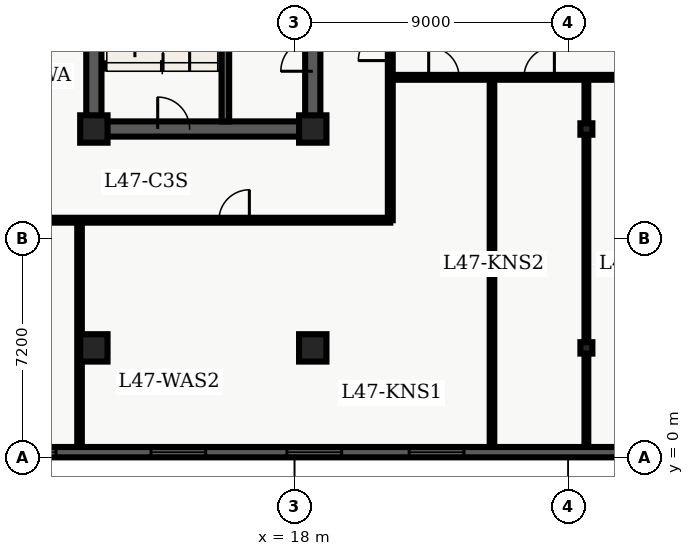
"""IFC4 building model, lengths in metres.
Left out: names, types, materials, properties, quantities, classifications, styles, units other than length and angle.
Written with IfcOpenShell. Run it as: python <this file> out.ifc"""

import sys

from ifc_helpers import new_model, entity, si_unit, converted_unit, direction, frame, origin_with_axes, origin_2d_with_axis, place, context, subcontext, project, spatial, polyline, rectangle, i_section, outline, extrude, element, fill, save


model = new_model("IFC4")
c1 = context("Model", 3, precision=1e-05, world=origin_with_axes(), true_north=direction((0.0, 1.0)))
c2 = subcontext(c1, "Body", "Model", "MODEL_VIEW")
j1 = project(units=[si_unit("LENGTHUNIT", "METRE"), converted_unit("PLANEANGLEUNIT", "DEGREE", entity("IfcPlaneAngleMeasure", 0.017), si_unit("PLANEANGLEUNIT", "RADIAN"), dimensions=[0, 0, 0, 0, 0, 0, 0])], contexts=[c1])
p1 = place(None, origin_with_axes())
s1 = spatial("IfcSite", under=j1, at=p1, CompositionType="ELEMENT")
p2 = place(p1, origin_with_axes())
s2 = spatial("IfcBuilding", under=s1, at=p2, CompositionType="ELEMENT")
p3 = place(p2, frame((0.0, 0.0, 192.6), z_axis=(0.0, 0.0, 1.0), x_axis=(1.0, 0.0, 0.0)))
s3 = spatial("IfcBuildingStorey", under=s2, at=p3, CompositionType="ELEMENT", Elevation=192.6)
p4 = place(p3, frame((11.4, 10.8, 0.0), z_axis=(0.0, 0.0, 1.0), x_axis=(0.0, 1.0, 0.0)))
e1 = element("IfcWall", 1, at=p4, inside=s3, PredefinedType="SHEAR", context=c2, shape_type="SweptSolid", body=[
    extrude(outline(polyline([(0.0, -0.25), (27.0, -0.25), (27.0, 0.25), (0.0, 0.25), (0.0, -0.25)])), origin_with_axes(), (0.0, 0.0, 1.0), 3.66),
])
p5 = place(p3, frame((11.4, 10.8, 0.0), z_axis=(0.0, 0.0, 1.0), x_axis=(1.0, 0.0, 0.0)))
e2 = element("IfcWall", 2, at=p5, inside=s3, PredefinedType="SHEAR", context=c2, shape_type="SweptSolid", body=[
    extrude(outline(polyline([(0.0, -0.25), (7.2, -0.25), (7.2, 0.25), (0.0, 0.25), (0.0, -0.25)])), origin_with_axes(), (0.0, 0.0, 1.0), 3.66),
])
p6 = place(p5, frame((2.625, 0.0, 0.0), z_axis=(0.0, 0.0, 1.0), x_axis=(1.0, 0.0, 0.0)))
e3 = element("IfcOpeningElement", 3, at=p6, cuts=e2, PredefinedType="OPENING", context=c2, shape_type="SweptSolid", body=[
    extrude(rectangle(XDim=1.05, YDim=0.52, at=origin_2d_with_axis()), origin_with_axes(), (0.0, 0.0, 1.0), 2.15),
])
p7 = place(p3, frame((18.6, 10.8, 0.0), z_axis=(0.0, 0.0, 1.0), x_axis=(0.0, 1.0, 0.0)))
e4 = element("IfcWall", 4, at=p7, inside=s3, PredefinedType="SHEAR", context=c2, shape_type="SweptSolid", body=[
    extrude(outline(polyline([(0.0, -0.25), (13.5, -0.25), (13.5, 0.25), (0.0, 0.25), (0.0, -0.25)])), origin_with_axes(), (0.0, 0.0, 1.0), 3.66),
])
p8 = place(p7, frame((11.125, 0.0, 0.0), z_axis=(0.0, 0.0, 1.0), x_axis=(1.0, 0.0, 0.0)))
e5 = element("IfcOpeningElement", 5, at=p8, cuts=e4, PredefinedType="OPENING", context=c2, shape_type="SweptSolid", body=[
    extrude(rectangle(XDim=1.05, YDim=0.52, at=origin_2d_with_axis()), origin_with_axes(), (0.0, 0.0, 1.0), 2.15),
])
p9 = place(p7, frame((2.425, 0.0, 0.0), z_axis=(0.0, 0.0, 1.0), x_axis=(1.0, 0.0, 0.0)))
e6 = element("IfcOpeningElement", 6, at=p9, cuts=e4, PredefinedType="OPENING", context=c2, shape_type="SweptSolid", body=[
    extrude(rectangle(XDim=1.05, YDim=0.52, at=origin_2d_with_axis()), origin_with_axes(), (0.0, 0.0, 1.0), 2.15),
])
p10 = place(p7, frame((6.625, 0.0, 0.0), z_axis=(0.0, 0.0, 1.0), x_axis=(1.0, 0.0, 0.0)))
e7 = element("IfcOpeningElement", 7, at=p10, cuts=e4, PredefinedType="OPENING", context=c2, shape_type="SweptSolid", body=[
    extrude(rectangle(XDim=1.05, YDim=0.52, at=origin_2d_with_axis()), origin_with_axes(), (0.0, 0.0, 1.0), 2.15),
])
p11 = place(p3, frame((15.725, 11.05, 0.0), z_axis=(0.0, 0.0, 1.0), x_axis=(0.0, 1.0, 0.0)))
e8 = element("IfcWall", 8, at=p11, inside=s3, PredefinedType="SHEAR", context=c2, shape_type="SweptSolid", body=[
    extrude(outline(polyline([(0.0, -0.125), (8.65, -0.125), (8.65, 0.125), (0.0, 0.125), (0.0, -0.125)])), origin_with_axes(), (0.0, 0.0, 1.0), 3.66),
])
for number, where, z_axis, x_axis in (
    (9, (11.4, 3.6, 0.0), (0.0, 0.0, 1.0), (1.0, 0.0, 0.0)),
    (10, (11.4, 10.8, 0.0), (0.0, 0.0, 1.0), (1.0, 0.0, 0.0)),
    (11, (18.6, 3.6, 0.0), (0.0, 0.0, 1.0), (1.0, 0.0, 0.0)),
    (12, (18.6, 10.8, 0.0), (0.0, 0.0, 1.0), (1.0, 0.0, 0.0)),
):
    element("IfcColumn", number, at=place(p3, frame(where, z_axis=z_axis, x_axis=x_axis)), inside=s3, PredefinedType="COLUMN", context=c2, shape_type="SweptSolid", body=[
        extrude(rectangle(XDim=0.9, YDim=0.9, at=origin_2d_with_axis()), origin_with_axes(), (0.0, 0.0, 1.0), 3.9),
    ])
for number, where, z_axis, x_axis in (
    (13, (27.6, 3.6, 0.0), (0.0, 0.0, 1.0), (1.0, 0.0, 0.0)),
    (14, (27.6, 10.8, 0.0), (0.0, 0.0, 1.0), (1.0, 0.0, 0.0)),
):
    element("IfcColumn", number, at=place(p3, frame(where, z_axis=z_axis, x_axis=x_axis)), inside=s3, PredefinedType="COLUMN", context=c2, shape_type="SweptSolid", body=[
        extrude(i_section(OverallWidth=0.394, OverallDepth=0.375, WebThickness=0.017, FlangeThickness=0.028, FilletRadius=0.02, at=origin_2d_with_axis()), origin_with_axes(), (0.0, 0.0, 1.0), 3.9),
    ])
p12 = place(p3, frame((2.6, 7.8, 0.0), z_axis=(0.0, 0.0, 1.0), x_axis=(1.0, 0.0, 0.0)))
e15 = element("IfcWall", 15, at=p12, inside=s3, PredefinedType="PARTITIONING", context=c2, shape_type="SweptSolid", body=[
    extrude(outline(polyline([(0.0, -0.08), (18.55, -0.08), (18.55, 0.08), (0.0, 0.08), (0.0, -0.08)])), origin_with_axes(), (0.0, 0.0, 1.0), 2.7),
])
p13 = place(p12, frame((5.04, 0.0, 0.0), z_axis=(0.0, 0.0, 1.0), x_axis=(1.0, 0.0, 0.0)))
e16 = element("IfcOpeningElement", 16, at=p13, cuts=e15, PredefinedType="OPENING", context=c2, shape_type="SweptSolid", body=[
    extrude(rectangle(XDim=1.2, YDim=0.18, at=origin_2d_with_axis()), origin_with_axes(), (0.0, 0.0, 1.0), 2.2),
])
p14 = place(p12, frame((13.415, 0.0, 0.0), z_axis=(0.0, 0.0, 1.0), x_axis=(1.0, 0.0, 0.0)))
e17 = element("IfcOpeningElement", 17, at=p14, cuts=e15, PredefinedType="OPENING", context=c2, shape_type="SweptSolid", body=[
    extrude(rectangle(XDim=1.0, YDim=0.18, at=origin_2d_with_axis()), origin_with_axes(), (0.0, 0.0, 1.0), 2.15),
])
p15 = place(p3, frame((21.15, 7.8, 0.0), z_axis=(0.0, 0.0, 1.0), x_axis=(0.0, 1.0, 0.0)))
e18 = element("IfcWall", 18, at=p15, inside=s3, PredefinedType="PARTITIONING", context=c2, shape_type="SweptSolid", body=[
    extrude(outline(polyline([(0.0, -0.08), (32.7, -0.08), (32.7, 0.08), (0.0, 0.08), (0.0, -0.08)])), origin_with_axes(), (0.0, 0.0, 1.0), 2.7),
])
p16 = place(p15, frame((15.589, 0.0, 0.0), z_axis=(0.0, 0.0, 1.0), x_axis=(1.0, 0.0, 0.0)))
e19 = element("IfcOpeningElement", 19, at=p16, cuts=e18, PredefinedType="OPENING", context=c2, shape_type="SweptSolid", body=[
    extrude(rectangle(XDim=1.0, YDim=0.18, at=origin_2d_with_axis()), origin_with_axes(), (0.0, 0.0, 1.0), 2.15),
])
p17 = place(p15, frame((19.026, 0.0, 0.0), z_axis=(0.0, 0.0, 1.0), x_axis=(1.0, 0.0, 0.0)))
e20 = element("IfcOpeningElement", 20, at=p17, cuts=e18, PredefinedType="OPENING", context=c2, shape_type="SweptSolid", body=[
    extrude(rectangle(XDim=1.0, YDim=0.18, at=origin_2d_with_axis()), origin_with_axes(), (0.0, 0.0, 1.0), 2.15),
])
p18 = place(p15, frame((22.849, 0.0, 0.0), z_axis=(0.0, 0.0, 1.0), x_axis=(1.0, 0.0, 0.0)))
e21 = element("IfcOpeningElement", 21, at=p18, cuts=e18, PredefinedType="OPENING", context=c2, shape_type="SweptSolid", body=[
    extrude(rectangle(XDim=1.0, YDim=0.18, at=origin_2d_with_axis()), origin_with_axes(), (0.0, 0.0, 1.0), 2.15),
])
p19 = place(p15, frame((27.204, 0.0, 0.0), z_axis=(0.0, 0.0, 1.0), x_axis=(1.0, 0.0, 0.0)))
e22 = element("IfcOpeningElement", 22, at=p19, cuts=e18, PredefinedType="OPENING", context=c2, shape_type="SweptSolid", body=[
    extrude(rectangle(XDim=1.0, YDim=0.18, at=origin_2d_with_axis()), origin_with_axes(), (0.0, 0.0, 1.0), 2.15),
])
p20 = place(p15, frame((31.042, 0.0, 0.0), z_axis=(0.0, 0.0, 1.0), x_axis=(1.0, 0.0, 0.0)))
e23 = element("IfcOpeningElement", 23, at=p20, cuts=e18, PredefinedType="OPENING", context=c2, shape_type="SweptSolid", body=[
    extrude(rectangle(XDim=1.0, YDim=0.18, at=origin_2d_with_axis()), origin_with_axes(), (0.0, 0.0, 1.0), 2.15),
])
p21 = place(p15, frame((5.775, 0.0, 0.0), z_axis=(0.0, 0.0, 1.0), x_axis=(1.0, 0.0, 0.0)))
e24 = element("IfcOpeningElement", 24, at=p21, cuts=e18, PredefinedType="OPENING", context=c2, shape_type="SweptSolid", body=[
    extrude(rectangle(XDim=1.05, YDim=0.18, at=origin_2d_with_axis()), origin_with_axes(), (0.0, 0.0, 1.0), 2.15),
])
p22 = place(p3, frame((10.929, 0.335, 0.0), z_axis=(0.0, 0.0, 1.0), x_axis=(0.0, 1.0, 0.0)))
e25 = element("IfcWall", 25, at=p22, inside=s3, PredefinedType="PARTITIONING", context=c2, shape_type="SweptSolid", body=[
    extrude(outline(polyline([(0.0, -0.075), (7.365, -0.075), (7.365, 0.075), (0.0, 0.075), (0.0, -0.075)])), origin_with_axes(), (0.0, 0.0, 1.0), 2.7),
])
p23 = place(p3, frame((21.15, 12.5, 0.0), z_axis=(0.0, 0.0, 1.0), x_axis=(1.0, 0.0, 0.0)))
e26 = element("IfcWall", 26, at=p23, inside=s3, PredefinedType="PARTITIONING", context=c2, shape_type="SweptSolid", body=[
    extrude(outline(polyline([(0.0, -0.08), (15.2, -0.08), (15.2, 0.08), (0.0, 0.08), (0.0, -0.08)])), origin_with_axes(), (0.0, 0.0, 1.0), 2.7),
])
p24 = place(p23, frame((1.762, 0.0, 0.0), z_axis=(0.0, 0.0, 1.0), x_axis=(1.0, 0.0, 0.0)))
e27 = element("IfcOpeningElement", 27, at=p24, cuts=e26, PredefinedType="OPENING", context=c2, shape_type="SweptSolid", body=[
    extrude(rectangle(XDim=1.0, YDim=0.18, at=origin_2d_with_axis()), origin_with_axes(), (0.0, 0.0, 1.0), 2.15),
])
p25 = place(p23, frame((4.897, 0.0, 0.0), z_axis=(0.0, 0.0, 1.0), x_axis=(1.0, 0.0, 0.0)))
e28 = element("IfcOpeningElement", 28, at=p25, cuts=e26, PredefinedType="OPENING", context=c2, shape_type="SweptSolid", body=[
    extrude(rectangle(XDim=1.0, YDim=0.18, at=origin_2d_with_axis()), origin_with_axes(), (0.0, 0.0, 1.0), 2.15),
])
p26 = place(p23, frame((8.527, 0.0, 0.0), z_axis=(0.0, 0.0, 1.0), x_axis=(1.0, 0.0, 0.0)))
e29 = element("IfcOpeningElement", 29, at=p26, cuts=e26, PredefinedType="OPENING", context=c2, shape_type="SweptSolid", body=[
    extrude(rectangle(XDim=1.0, YDim=0.18, at=origin_2d_with_axis()), origin_with_axes(), (0.0, 0.0, 1.0), 2.15),
])
p27 = place(p23, frame((12.863, 0.0, 0.0), z_axis=(0.0, 0.0, 1.0), x_axis=(1.0, 0.0, 0.0)))
e30 = element("IfcOpeningElement", 30, at=p27, cuts=e26, PredefinedType="OPENING", context=c2, shape_type="SweptSolid", body=[
    extrude(rectangle(XDim=1.0, YDim=0.18, at=origin_2d_with_axis()), origin_with_axes(), (0.0, 0.0, 1.0), 2.15),
])
p28 = place(p3, frame((24.495, 0.335, 0.0), z_axis=(0.0, 0.0, 1.0), x_axis=(0.0, 1.0, 0.0)))
e31 = element("IfcWall", 31, at=p28, inside=s3, PredefinedType="PARTITIONING", context=c2, shape_type="SweptSolid", body=[
    extrude(outline(polyline([(0.0, -0.075), (12.045, -0.075), (12.045, 0.075), (0.0, 0.075), (0.0, -0.075)])), origin_with_axes(), (0.0, 0.0, 1.0), 2.7),
])
p29 = place(p3, frame((27.6, 0.335, 0.0), z_axis=(0.0, 0.0, 1.0), x_axis=(0.0, 1.0, 0.0)))
e32 = element("IfcWall", 32, at=p29, inside=s3, PredefinedType="PARTITIONING", context=c2, shape_type="SweptSolid", body=[
    extrude(outline(polyline([(0.0, -0.062), (12.045, -0.062), (12.045, 0.062), (0.0, 0.062), (0.0, -0.062)])), origin_with_axes(), (0.0, 0.0, 1.0), 2.7),
])
p30 = place(p3, frame((57.26, 0.17, 0.0), z_axis=(0.0, 0.0, 1.0), x_axis=(-1.0, 0.0, 0.0)))
e33 = element("IfcWall", 33, at=p30, inside=s3, PredefinedType="SOLIDWALL", context=c2, shape_type="SweptSolid", body=[
    extrude(outline(polyline([(0.0, -0.17), (54.86, -0.17), (54.86, 0.17), (0.0, 0.17), (0.0, -0.17)])), origin_with_axes(), (0.0, 0.0, 1.0), 3.66),
])
p31 = place(p30, frame((2.836, 0.0, 0.45), z_axis=(0.0, 0.0, 1.0), x_axis=(1.0, 0.0, 0.0)))
e34 = element("IfcOpeningElement", 34, at=p31, cuts=e33, PredefinedType="OPENING", context=c2, shape_type="SweptSolid", body=[
    extrude(rectangle(XDim=1.8, YDim=0.36, at=origin_2d_with_axis()), origin_with_axes(), (0.0, 0.0, 1.0), 2.1),
])
p32 = place(p30, frame((7.307, 0.0, 0.45), z_axis=(0.0, 0.0, 1.0), x_axis=(1.0, 0.0, 0.0)))
e35 = element("IfcOpeningElement", 35, at=p32, cuts=e33, PredefinedType="OPENING", context=c2, shape_type="SweptSolid", body=[
    extrude(rectangle(XDim=1.8, YDim=0.36, at=origin_2d_with_axis()), origin_with_axes(), (0.0, 0.0, 1.0), 2.1),
])
p33 = place(p30, frame((11.779, 0.0, 0.45), z_axis=(0.0, 0.0, 1.0), x_axis=(1.0, 0.0, 0.0)))
e36 = element("IfcOpeningElement", 36, at=p33, cuts=e33, PredefinedType="OPENING", context=c2, shape_type="SweptSolid", body=[
    extrude(rectangle(XDim=1.8, YDim=0.36, at=origin_2d_with_axis()), origin_with_axes(), (0.0, 0.0, 1.0), 2.1),
])
p34 = place(p30, frame((16.251, 0.0, 0.45), z_axis=(0.0, 0.0, 1.0), x_axis=(1.0, 0.0, 0.0)))
e37 = element("IfcOpeningElement", 37, at=p34, cuts=e33, PredefinedType="OPENING", context=c2, shape_type="SweptSolid", body=[
    extrude(rectangle(XDim=1.8, YDim=0.36, at=origin_2d_with_axis()), origin_with_axes(), (0.0, 0.0, 1.0), 2.1),
])
p35 = place(p30, frame((20.723, 0.0, 0.45), z_axis=(0.0, 0.0, 1.0), x_axis=(1.0, 0.0, 0.0)))
e38 = element("IfcOpeningElement", 38, at=p35, cuts=e33, PredefinedType="OPENING", context=c2, shape_type="SweptSolid", body=[
    extrude(rectangle(XDim=1.8, YDim=0.36, at=origin_2d_with_axis()), origin_with_axes(), (0.0, 0.0, 1.0), 2.1),
])
p36 = place(p30, frame((34.588, 0.0, 0.45), z_axis=(0.0, 0.0, 1.0), x_axis=(1.0, 0.0, 0.0)))
e39 = element("IfcOpeningElement", 39, at=p36, cuts=e33, PredefinedType="OPENING", context=c2, shape_type="SweptSolid", body=[
    extrude(rectangle(XDim=1.8, YDim=0.36, at=origin_2d_with_axis()), origin_with_axes(), (0.0, 0.0, 1.0), 2.1),
])
p37 = place(p30, frame((38.609, 0.0, 0.45), z_axis=(0.0, 0.0, 1.0), x_axis=(1.0, 0.0, 0.0)))
e40 = element("IfcOpeningElement", 40, at=p37, cuts=e33, PredefinedType="OPENING", context=c2, shape_type="SweptSolid", body=[
    extrude(rectangle(XDim=1.8, YDim=0.36, at=origin_2d_with_axis()), origin_with_axes(), (0.0, 0.0, 1.0), 2.1),
])
p38 = place(p30, frame((43.081, 0.0, 0.45), z_axis=(0.0, 0.0, 1.0), x_axis=(1.0, 0.0, 0.0)))
e41 = element("IfcOpeningElement", 41, at=p38, cuts=e33, PredefinedType="OPENING", context=c2, shape_type="SweptSolid", body=[
    extrude(rectangle(XDim=1.8, YDim=0.36, at=origin_2d_with_axis()), origin_with_axes(), (0.0, 0.0, 1.0), 2.1),
])
p39 = place(p30, frame((48.003, 0.0, 0.45), z_axis=(0.0, 0.0, 1.0), x_axis=(1.0, 0.0, 0.0)))
e42 = element("IfcOpeningElement", 42, at=p39, cuts=e33, PredefinedType="OPENING", context=c2, shape_type="SweptSolid", body=[
    extrude(rectangle(XDim=1.8, YDim=0.36, at=origin_2d_with_axis()), origin_with_axes(), (0.0, 0.0, 1.0), 2.1),
])
p40 = place(p30, frame((52.024, 0.0, 0.45), z_axis=(0.0, 0.0, 1.0), x_axis=(1.0, 0.0, 0.0)))
e43 = element("IfcOpeningElement", 43, at=p40, cuts=e33, PredefinedType="OPENING", context=c2, shape_type="SweptSolid", body=[
    extrude(rectangle(XDim=1.8, YDim=0.36, at=origin_2d_with_axis()), origin_with_axes(), (0.0, 0.0, 1.0), 2.1),
])
p41 = place(p5, frame((2.625, 0.0, 0.0), z_axis=(0.0, 0.0, 1.0), x_axis=(1.0, 0.0, 0.0)))
e44 = element("IfcDoor", 44, at=p41, inside=s3, OperationType="SINGLE_SWING_LEFT", PredefinedType="DOOR", context=c2, shape_type="SweptSolid", body=[
    extrude(rectangle(XDim=1.05, YDim=0.09, at=origin_2d_with_axis()), origin_with_axes(), (0.0, 0.0, 1.0), 2.15),
])
fill(e3, e44)
p42 = place(p7, frame((2.425, 0.0, 0.0), z_axis=(0.0, 0.0, 1.0), x_axis=(1.0, 0.0, 0.0)))
e45 = element("IfcDoor", 45, at=p42, inside=s3, OperationType="SINGLE_SWING_LEFT", PredefinedType="DOOR", context=c2, shape_type="SweptSolid", body=[
    extrude(rectangle(XDim=1.05, YDim=0.09, at=origin_2d_with_axis()), origin_with_axes(), (0.0, 0.0, 1.0), 2.15),
])
fill(e6, e45)
p43 = place(p12, frame((13.415, 0.0, 0.0), z_axis=(0.0, 0.0, 1.0), x_axis=(1.0, 0.0, 0.0)))
e46 = element("IfcDoor", 46, at=p43, inside=s3, OperationType="SINGLE_SWING_RIGHT", PredefinedType="DOOR", context=c2, shape_type="SweptSolid", body=[
    extrude(rectangle(XDim=1.0, YDim=0.09, at=origin_2d_with_axis()), origin_with_axes(), (0.0, 0.0, 1.0), 2.15),
])
fill(e17, e46)
p44 = place(p15, frame((5.775, 0.0, 0.0), z_axis=(0.0, 0.0, 1.0), x_axis=(1.0, 0.0, 0.0)))
e47 = element("IfcDoor", 47, at=p44, inside=s3, OperationType="SINGLE_SWING_LEFT", PredefinedType="DOOR", context=c2, shape_type="SweptSolid", body=[
    extrude(rectangle(XDim=1.05, YDim=0.09, at=origin_2d_with_axis()), origin_with_axes(), (0.0, 0.0, 1.0), 2.15),
])
fill(e24, e47)
p45 = place(p23, frame((1.762, 0.0, 0.0), z_axis=(0.0, 0.0, 1.0), x_axis=(1.0, 0.0, 0.0)))
e48 = element("IfcDoor", 48, at=p45, inside=s3, OperationType="SINGLE_SWING_LEFT", PredefinedType="DOOR", context=c2, shape_type="SweptSolid", body=[
    extrude(rectangle(XDim=1.0, YDim=0.09, at=origin_2d_with_axis()), origin_with_axes(), (0.0, 0.0, 1.0), 2.15),
])
fill(e27, e48)
p46 = place(p23, frame((4.897, 0.0, 0.0), z_axis=(0.0, 0.0, 1.0), x_axis=(1.0, 0.0, 0.0)))
e49 = element("IfcDoor", 49, at=p46, inside=s3, OperationType="SINGLE_SWING_RIGHT", PredefinedType="DOOR", context=c2, shape_type="SweptSolid", body=[
    extrude(rectangle(XDim=1.0, YDim=0.09, at=origin_2d_with_axis()), origin_with_axes(), (0.0, 0.0, 1.0), 2.15),
])
fill(e28, e49)
p47 = place(p30, frame((34.588, 0.0, 0.45), z_axis=(0.0, 0.0, 1.0), x_axis=(1.0, 0.0, 0.0)))
e50 = element("IfcWindow", 50, at=p47, inside=s3, PredefinedType="WINDOW", context=c2, shape_type="SweptSolid", body=[
    extrude(rectangle(XDim=1.8, YDim=0.09, at=origin_2d_with_axis()), origin_with_axes(), (0.0, 0.0, 1.0), 2.1),
])
fill(e39, e50)
p48 = place(p30, frame((38.609, 0.0, 0.45), z_axis=(0.0, 0.0, 1.0), x_axis=(1.0, 0.0, 0.0)))
e51 = element("IfcWindow", 51, at=p48, inside=s3, PredefinedType="WINDOW", context=c2, shape_type="SweptSolid", body=[
    extrude(rectangle(XDim=1.8, YDim=0.09, at=origin_2d_with_axis()), origin_with_axes(), (0.0, 0.0, 1.0), 2.1),
])
fill(e40, e51)
p49 = place(p30, frame((43.081, 0.0, 0.45), z_axis=(0.0, 0.0, 1.0), x_axis=(1.0, 0.0, 0.0)))
e52 = element("IfcWindow", 52, at=p49, inside=s3, PredefinedType="WINDOW", context=c2, shape_type="SweptSolid", body=[
    extrude(rectangle(XDim=1.8, YDim=0.09, at=origin_2d_with_axis()), origin_with_axes(), (0.0, 0.0, 1.0), 2.1),
])
fill(e41, e52)
p50 = place(p30, frame((48.003, 0.0, 0.45), z_axis=(0.0, 0.0, 1.0), x_axis=(1.0, 0.0, 0.0)))
e53 = element("IfcWindow", 53, at=p50, inside=s3, PredefinedType="WINDOW", context=c2, shape_type="SweptSolid", body=[
    extrude(rectangle(XDim=1.8, YDim=0.09, at=origin_2d_with_axis()), origin_with_axes(), (0.0, 0.0, 1.0), 2.1),
])
fill(e42, e53)
save(model, sys.argv[1])
